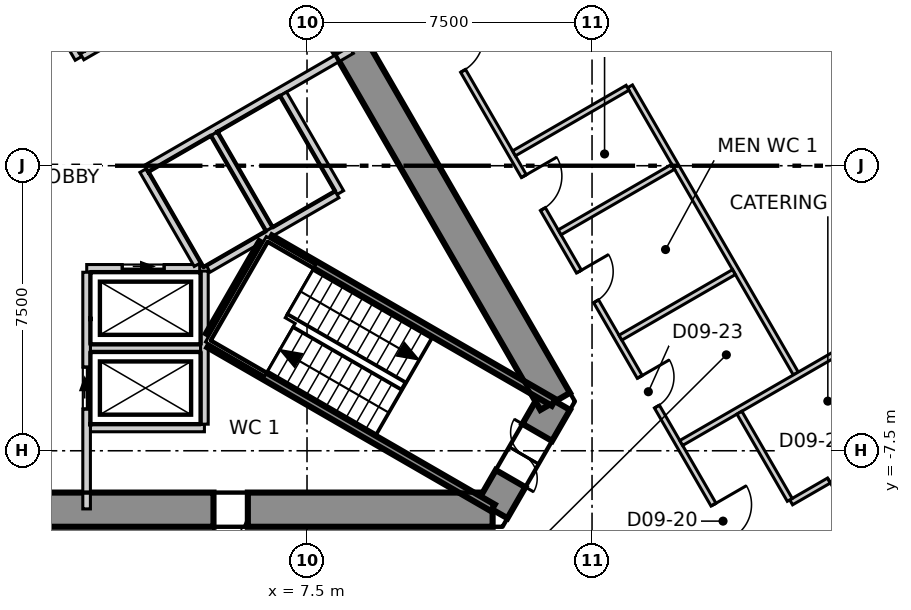
"""IFC4 building model, lengths in metres.
Left out: names, types, materials, properties, quantities, classifications, styles, units other than length and angle.
Written with IfcOpenShell. Run it as: python <this file> out.ifc"""

import sys

from ifc_helpers import new_model, si_unit, direction, frame, frame_2d, origin, place, context, subcontext, project, spatial, polyline, rectangle, outline, extrude, element, fill, save


model = new_model("IFC4")
c1 = context("Model", 3, precision=1e-05, world=origin(), true_north=direction((0.0, 1.0)))
c2 = subcontext(c1, "Body", "Model", "MODEL_VIEW")
j1 = project(units=[si_unit("LENGTHUNIT", "METRE"), si_unit("PLANEANGLEUNIT", "RADIAN")], contexts=[c1])
p1 = place(None, origin())
s1 = spatial("IfcSite", under=j1, at=p1, CompositionType="ELEMENT")
p2 = place(p1, origin())
s2 = spatial("IfcBuilding", under=s1, at=p2, CompositionType="ELEMENT")
p3 = place(p2, frame((0.0, 0.0, 47.3)))
s3 = spatial("IfcBuildingStorey", under=s2, at=p3, CompositionType="ELEMENT", Elevation=47.3)
p4 = place(p3, frame((-12.384, -9.05, -0.3), z_axis=(0.0, 0.0, 1.0), x_axis=(1.0, 0.0, 0.0)))
e1 = element("IfcWall", 1, at=p4, inside=s3, PredefinedType="SHEAR", context=c2, shape_type="SweptSolid", body=[
    extrude(outline(polyline([(-0.26, -0.45), (1.685, -0.45), (3.63, -0.45), (5.576, -0.45), (7.521, -0.45), (9.466, -0.45), (11.411, -0.45), (13.357, -0.45), (15.302, -0.45), (17.247, -0.45), (19.192, -0.45), (21.138, -0.45), (23.083, -0.45), (25.028, -0.45), (24.508, 0.45), (22.643, 0.45), (20.778, 0.45), (18.912, 0.45), (17.047, 0.45), (15.182, 0.45), (13.317, 0.45), (11.451, 0.45), (9.586, 0.45), (7.721, 0.45), (5.856, 0.45), (3.99, 0.45), (2.125, 0.45), (0.26, 0.45), (-0.26, -0.45)])), origin(), (0.0, 0.0, 1.0), 4.0),
])
p5 = place(p4, frame((5.04, 0.0, 0.3)))
e2 = element("IfcOpeningElement", 2, at=p5, cuts=e1, PredefinedType="OPENING", context=c2, shape_type="SweptSolid", body=[
    extrude(rectangle(XDim=0.9, YDim=2.1, at=frame_2d((0.45, 1.05))), frame((0.0, 0.46, 0.0), z_axis=(0.0, -1.0, 0.0), x_axis=(1.0, 0.0, 0.0)), (0.0, 0.0, 1.0), 0.92),
])
p6 = place(p4, frame((17.425, 0.0, 0.3)))
e3 = element("IfcOpeningElement", 3, at=p6, cuts=e1, PredefinedType="OPENING", context=c2, shape_type="SweptSolid", body=[
    extrude(rectangle(XDim=0.9, YDim=2.1, at=frame_2d((0.45, 1.05))), frame((0.0, 0.46, 0.0), z_axis=(0.0, -1.0, 0.0), x_axis=(1.0, 0.0, 0.0)), (0.0, 0.0, 1.0), 0.92),
])
p7 = place(p3, frame((12.384, -9.05, -0.3), z_axis=(0.0, 0.0, 1.0), x_axis=(0.500111984565, 0.865960739811, 0.0)))
e4 = element("IfcWall", 4, at=p7, inside=s3, PredefinedType="SHEAR", context=c2, shape_type="SweptSolid", body=[
    extrude(outline(polyline([(-0.26, -0.45), (1.646, -0.449), (3.551, -0.449), (3.031, 0.45), (1.646, 0.45), (0.26, 0.45), (-0.26, -0.45)])), origin(), (0.0, 0.0, 1.0), 4.0),
])
p8 = place(p7, frame((0.946, 0.0, 0.3)))
e5 = element("IfcOpeningElement", 5, at=p8, cuts=e4, PredefinedType="OPENING", context=c2, shape_type="SweptSolid", body=[
    extrude(rectangle(XDim=1.4, YDim=2.1, at=frame_2d((0.7, 1.05))), frame((0.0, 0.46, 0.0), z_axis=(0.0, -1.0, 0.0), x_axis=(1.0, 0.0, 0.0)), (0.0, 0.0, 1.0), 0.92),
])
p9 = place(p3, frame((14.03, -6.2, -0.3), z_axis=(0.0, 0.0, 1.0), x_axis=(-0.500026485275, 0.866010111964, 0.0)))
e6 = element("IfcWall", 6, at=p9, inside=s3, PredefinedType="SHEAR", context=c2, shape_type="SweptSolid", body=[
    extrude(outline(polyline([(-0.26, -0.449), (1.685, -0.449), (3.63, -0.449), (5.576, -0.449), (7.521, -0.449), (9.466, -0.449), (11.411, -0.449), (13.357, -0.449), (15.302, -0.449), (17.247, -0.45), (19.192, -0.45), (21.138, -0.45), (23.083, -0.45), (25.028, -0.45), (24.509, 0.449), (22.644, 0.449), (20.778, 0.449), (18.913, 0.449), (17.048, 0.449), (15.182, 0.449), (13.317, 0.449), (11.452, 0.449), (9.587, 0.449), (7.721, 0.45), (5.856, 0.45), (3.991, 0.45), (2.125, 0.45), (0.26, 0.45), (-0.26, -0.449)])), origin(), (0.0, 0.0, 1.0), 4.0),
])
p10 = place(p9, frame((11.484, 0.0, 0.3)))
e7 = element("IfcOpeningElement", 7, at=p10, cuts=e6, PredefinedType="OPENING", context=c2, shape_type="SweptSolid", body=[
    extrude(rectangle(XDim=1.8, YDim=2.1, at=frame_2d((0.9, 1.05))), frame((0.0, 0.46, 0.0), z_axis=(0.0, -1.0, 0.0), x_axis=(1.0, 0.0, 0.0)), (0.0, 0.0, 1.0), 0.92),
])
p11 = place(p9, frame((18.976, 0.0, 0.3)))
e8 = element("IfcOpeningElement", 8, at=p11, cuts=e6, PredefinedType="OPENING", context=c2, shape_type="SweptSolid", body=[
    extrude(rectangle(XDim=0.9, YDim=2.1, at=frame_2d((0.45, 1.05))), frame((0.0, 0.46, 0.0), z_axis=(0.0, -1.0, 0.0), x_axis=(1.0, 0.0, 0.0)), (0.0, 0.0, 1.0), 0.92),
])
p12 = place(p3, frame((34.701, -16.089, 0.0), z_axis=(0.0, 0.0, 1.0), x_axis=(-0.499998722828, 0.866026141159, 0.0)))
e9 = element("IfcWall", 9, at=p12, inside=s3, PredefinedType="ELEMENTEDWALL", context=c2, shape_type="SweptSolid", body=[
    extrude(rectangle(XDim=62.548, YDim=0.2, at=frame_2d((31.274, 0.0))), origin(), (0.0, 0.0, 1.0), 3.7),
])
p13 = place(p12, frame((2.25, 0.0, 0.9)))
e10 = element("IfcOpeningElement", 10, at=p13, cuts=e9, PredefinedType="OPENING", context=c2, shape_type="SweptSolid", body=[
    extrude(rectangle(XDim=5.6, YDim=2.5, at=frame_2d((2.8, 1.25))), frame((0.0, 0.11, 0.0), z_axis=(0.0, -1.0, 0.0), x_axis=(1.0, 0.0, 0.0)), (0.0, 0.0, 1.0), 0.22),
])
p14 = place(p12, frame((9.746, 0.0, 0.9)))
e11 = element("IfcOpeningElement", 11, at=p14, cuts=e9, PredefinedType="OPENING", context=c2, shape_type="SweptSolid", body=[
    extrude(rectangle(XDim=5.6, YDim=2.5, at=frame_2d((2.8, 1.25))), frame((0.0, 0.11, 0.0), z_axis=(0.0, -1.0, 0.0), x_axis=(1.0, 0.0, 0.0)), (0.0, 0.0, 1.0), 0.22),
])
p15 = place(p12, frame((17.241, 0.0, 0.9)))
e12 = element("IfcOpeningElement", 12, at=p15, cuts=e9, PredefinedType="OPENING", context=c2, shape_type="SweptSolid", body=[
    extrude(rectangle(XDim=5.6, YDim=2.5, at=frame_2d((2.8, 1.25))), frame((0.0, 0.11, 0.0), z_axis=(0.0, -1.0, 0.0), x_axis=(1.0, 0.0, 0.0)), (0.0, 0.0, 1.0), 0.22),
])
p16 = place(p12, frame((24.736, 0.0, 0.9)))
e13 = element("IfcOpeningElement", 13, at=p16, cuts=e9, PredefinedType="OPENING", context=c2, shape_type="SweptSolid", body=[
    extrude(rectangle(XDim=5.6, YDim=2.5, at=frame_2d((2.8, 1.25))), frame((0.0, 0.11, 0.0), z_axis=(0.0, -1.0, 0.0), x_axis=(1.0, 0.0, 0.0)), (0.0, 0.0, 1.0), 0.22),
])
p17 = place(p12, frame((32.232, 0.0, 0.9)))
e14 = element("IfcOpeningElement", 14, at=p17, cuts=e9, PredefinedType="OPENING", context=c2, shape_type="SweptSolid", body=[
    extrude(rectangle(XDim=5.6, YDim=2.5, at=frame_2d((2.8, 1.25))), frame((0.0, 0.11, 0.0), z_axis=(0.0, -1.0, 0.0), x_axis=(1.0, 0.0, 0.0)), (0.0, 0.0, 1.0), 0.22),
])
p18 = place(p12, frame((39.727, 0.0, 0.9)))
e15 = element("IfcOpeningElement", 15, at=p18, cuts=e9, PredefinedType="OPENING", context=c2, shape_type="SweptSolid", body=[
    extrude(rectangle(XDim=5.6, YDim=2.5, at=frame_2d((2.8, 1.25))), frame((0.0, 0.11, 0.0), z_axis=(0.0, -1.0, 0.0), x_axis=(1.0, 0.0, 0.0)), (0.0, 0.0, 1.0), 0.22),
])
p19 = place(p12, frame((47.222, 0.0, 0.9)))
e16 = element("IfcOpeningElement", 16, at=p19, cuts=e9, PredefinedType="OPENING", context=c2, shape_type="SweptSolid", body=[
    extrude(rectangle(XDim=5.6, YDim=2.5, at=frame_2d((2.8, 1.25))), frame((0.0, 0.11, 0.0), z_axis=(0.0, -1.0, 0.0), x_axis=(1.0, 0.0, 0.0)), (0.0, 0.0, 1.0), 0.22),
])
p20 = place(p12, frame((54.717, 0.0, 0.9)))
e17 = element("IfcOpeningElement", 17, at=p20, cuts=e9, PredefinedType="OPENING", context=c2, shape_type="SweptSolid", body=[
    extrude(rectangle(XDim=5.6, YDim=2.5, at=frame_2d((2.8, 1.25))), frame((0.0, 0.11, 0.0), z_axis=(0.0, -1.0, 0.0), x_axis=(1.0, 0.0, 0.0)), (0.0, 0.0, 1.0), 0.22),
])
p21 = place(p3, frame((0.075, 22.47, 0.0), z_axis=(0.0, 0.0, 1.0), x_axis=(0.500002280369, -0.866024087209, 0.0)))
e18 = element("IfcWall", 18, at=p21, inside=s3, PredefinedType="PARTITIONING", context=c2, shape_type="SweptSolid", body=[
    extrude(rectangle(XDim=38.844, YDim=0.15, at=frame_2d((19.422, 0.0))), origin(), (0.0, 0.0, 1.0), 3.7),
])
p22 = place(p21, frame((36.244, 0.0, 0.0)))
e19 = element("IfcOpeningElement", 19, at=p22, cuts=e18, PredefinedType="OPENING", context=c2, shape_type="SweptSolid", body=[
    extrude(rectangle(XDim=1.0, YDim=2.1, at=frame_2d((0.5, 1.05))), frame((0.0, 0.085, 0.0), z_axis=(0.0, -1.0, 0.0), x_axis=(1.0, 0.0, 0.0)), (0.0, 0.0, 1.0), 0.17),
])
p23 = place(p21, frame((21.963, 0.0, 0.0)))
e20 = element("IfcOpeningElement", 20, at=p23, cuts=e18, PredefinedType="OPENING", context=c2, shape_type="SweptSolid", body=[
    extrude(rectangle(XDim=1.1, YDim=2.1, at=frame_2d((0.55, 1.05))), frame((0.0, 0.085, 0.0), z_axis=(0.0, -1.0, 0.0), x_axis=(1.0, 0.0, 0.0)), (0.0, 0.0, 1.0), 0.17),
])
p24 = place(p21, frame((32.363, 0.0, 0.0)))
e21 = element("IfcOpeningElement", 21, at=p24, cuts=e18, PredefinedType="OPENING", context=c2, shape_type="SweptSolid", body=[
    extrude(rectangle(XDim=0.9, YDim=2.1, at=frame_2d((0.45, 1.05))), frame((0.0, 0.085, 0.0), z_axis=(0.0, -1.0, 0.0), x_axis=(1.0, 0.0, 0.0)), (0.0, 0.0, 1.0), 0.17),
])
p25 = place(p21, frame((29.163, 0.0, 0.0)))
e22 = element("IfcOpeningElement", 22, at=p25, cuts=e18, PredefinedType="OPENING", context=c2, shape_type="SweptSolid", body=[
    extrude(rectangle(XDim=0.9, YDim=2.1, at=frame_2d((0.45, 1.05))), frame((0.0, 0.085, 0.0), z_axis=(0.0, -1.0, 0.0), x_axis=(1.0, 0.0, 0.0)), (0.0, 0.0, 1.0), 0.17),
])
p26 = place(p21, frame((26.263, 0.0, 0.0)))
e23 = element("IfcOpeningElement", 23, at=p26, cuts=e18, PredefinedType="OPENING", context=c2, shape_type="SweptSolid", body=[
    extrude(rectangle(XDim=1.0, YDim=2.1, at=frame_2d((0.5, 1.05))), frame((0.0, 0.085, 0.0), z_axis=(0.0, -1.0, 0.0), x_axis=(1.0, 0.0, 0.0)), (0.0, 0.0, 1.0), 0.17),
])
p27 = place(p21, frame((9.071, 0.0, 0.0)))
e24 = element("IfcOpeningElement", 24, at=p27, cuts=e18, PredefinedType="OPENING", context=c2, shape_type="SweptSolid", body=[
    extrude(rectangle(XDim=1.1, YDim=2.1, at=frame_2d((0.55, 1.05))), frame((0.0, 0.085, 0.0), z_axis=(0.0, -1.0, 0.0), x_axis=(1.0, 0.0, 0.0)), (0.0, 0.0, 1.0), 0.17),
])
p28 = place(p3, frame((15.999, 2.088, 0.0), z_axis=(0.0, 0.0, 1.0), x_axis=(0.500054279689, -0.865994063124, 0.0)))
e25 = element("IfcWall", 25, at=p28, inside=s3, PredefinedType="PARTITIONING", context=c2, shape_type="SweptSolid", body=[
    extrude(rectangle(XDim=8.725, YDim=0.15, at=frame_2d((4.363, 0.0))), origin(), (0.0, 0.0, 1.0), 3.7),
])
p29 = place(p3, frame((12.947, 0.326, 0.0), z_axis=(0.0, 0.0, 1.0), x_axis=(0.865960440485, 0.500112502858, 0.0)))
e26 = element("IfcWall", 26, at=p29, inside=s3, PredefinedType="PARTITIONING", context=c2, shape_type="SweptSolid", body=[
    extrude(rectangle(XDim=3.449, YDim=0.15, at=frame_2d((1.725, 0.0))), origin(), (0.0, 0.0, 1.0), 3.7),
])
p30 = place(p3, frame((14.147, -1.753, 0.0), z_axis=(0.0, 0.0, 1.0), x_axis=(0.865991092016, 0.500059425018, 0.0)))
e27 = element("IfcWall", 27, at=p30, inside=s3, PredefinedType="PARTITIONING", context=c2, shape_type="SweptSolid", body=[
    extrude(rectangle(XDim=3.449, YDim=0.15, at=frame_2d((1.725, 0.0))), origin(), (0.0, 0.0, 1.0), 3.7),
])
p31 = place(p3, frame((15.747, -4.524, 0.0), z_axis=(0.0, 0.0, 1.0), x_axis=(0.865973391227, 0.500090077572, 0.0)))
e28 = element("IfcWall", 28, at=p31, inside=s3, PredefinedType="PARTITIONING", context=c2, shape_type="SweptSolid", body=[
    extrude(rectangle(XDim=3.449, YDim=0.15, at=frame_2d((1.725, 0.0))), origin(), (0.0, 0.0, 1.0), 3.7),
])
p32 = place(p3, frame((17.347, -7.295, 0.0), z_axis=(0.0, 0.0, 1.0), x_axis=(0.866027613664, 0.499996172356, 0.0)))
e29 = element("IfcWall", 29, at=p32, inside=s3, PredefinedType="PARTITIONING", context=c2, shape_type="SweptSolid", body=[
    extrude(rectangle(XDim=10.552, YDim=0.15, at=frame_2d((5.276, 0.0))), origin(), (0.0, 0.0, 1.0), 3.7),
])
p33 = place(p3, frame((20.24, -8.857, 0.0), z_axis=(0.0, 0.0, 1.0), x_axis=(0.866099216793, 0.499872130319, 0.0)))
e30 = element("IfcWall", 30, at=p33, inside=s3, PredefinedType="PARTITIONING", context=c2, shape_type="SweptSolid", body=[
    extrude(rectangle(XDim=3.2, YDim=0.15, at=frame_2d((1.6, 0.0))), origin(), (0.0, 0.0, 1.0), 3.7),
])
p34 = place(p33, frame((1.15, 0.0, 0.0)))
e31 = element("IfcOpeningElement", 31, at=p34, cuts=e30, PredefinedType="OPENING", context=c2, shape_type="SweptSolid", body=[
    extrude(rectangle(XDim=0.9, YDim=2.1, at=frame_2d((0.45, 1.05))), frame((0.0, 0.085, 0.0), z_axis=(0.0, -1.0, 0.0), x_axis=(1.0, 0.0, 0.0)), (0.0, 0.0, 1.0), 0.17),
])
p35 = place(p3, frame((18.878, -6.498, 0.0), z_axis=(0.0, 0.0, 1.0), x_axis=(0.500153222552, -0.865936922628, 0.0)))
e32 = element("IfcWall", 32, at=p35, inside=s3, PredefinedType="PARTITIONING", context=c2, shape_type="SweptSolid", body=[
    extrude(rectangle(XDim=2.649, YDim=0.15, at=frame_2d((1.325, 0.0))), origin(), (0.0, 0.0, 1.0), 3.7),
])
p36 = place(p3, frame((1.8, -4.8, 0.0), z_axis=(0.0, 0.0, 1.0), x_axis=(1.0, 0.0, 0.0)))
e33 = element("IfcWall", 33, at=p36, inside=s3, PredefinedType="SOLIDWALL", context=c2, shape_type="SweptSolid", body=[
    extrude(rectangle(XDim=2.9, YDim=0.2, at=frame_2d((1.45, 0.0))), origin(), (0.0, 0.0, 1.0), 3.7),
])
p37 = place(p3, frame((1.8, -6.9, 0.0), z_axis=(0.0, 0.0, 1.0), x_axis=(1.0, 0.0, 0.0)))
e34 = element("IfcWall", 34, at=p37, inside=s3, PredefinedType="SOLIDWALL", context=c2, shape_type="SweptSolid", body=[
    extrude(rectangle(XDim=3.0, YDim=0.2, at=frame_2d((1.5, 0.0))), origin(), (0.0, 0.0, 1.0), 3.7),
])
p38 = place(p3, frame((1.703, -2.7, 0.0), z_axis=(0.0, 0.0, 1.0), x_axis=(1.0, 0.0, 0.0)))
e35 = element("IfcWall", 35, at=p38, inside=s3, PredefinedType="SOLIDWALL", context=c2, shape_type="SweptSolid", body=[
    extrude(rectangle(XDim=2.973, YDim=0.2, at=frame_2d((1.487, 0.0))), origin(), (0.0, 0.0, 1.0), 3.7),
])
p39 = place(p38, frame((0.936, 0.0, 0.0)))
e36 = element("IfcOpeningElement", 36, at=p39, cuts=e35, PredefinedType="OPENING", context=c2, shape_type="SweptSolid", body=[
    extrude(rectangle(XDim=1.1, YDim=2.1, at=frame_2d((0.55, 1.05))), frame((0.0, 0.11, 0.0), z_axis=(0.0, -1.0, 0.0), x_axis=(1.0, 0.0, 0.0)), (0.0, 0.0, 1.0), 0.22),
])
p40 = place(p3, frame((0.0, 5.4, 0.0), z_axis=(0.0, 0.0, 1.0), x_axis=(0.500103862429, -0.865965430478, 0.0)))
e37 = element("IfcWall", 37, at=p40, inside=s3, PredefinedType="SOLIDWALL", context=c2, shape_type="SweptSolid", body=[
    extrude(rectangle(XDim=2.973, YDim=0.2, at=frame_2d((1.487, 0.0))), origin(), (0.0, 0.0, 1.0), 3.7),
])
p41 = place(p40, frame((0.937, 0.0, 0.0)))
e38 = element("IfcOpeningElement", 38, at=p41, cuts=e37, PredefinedType="OPENING", context=c2, shape_type="SweptSolid", body=[
    extrude(rectangle(XDim=1.1, YDim=2.1, at=frame_2d((0.55, 1.05))), frame((0.0, 0.11, 0.0), z_axis=(0.0, -1.0, 0.0), x_axis=(1.0, 0.0, 0.0)), (0.0, 0.0, 1.0), 0.22),
])
p42 = place(p3, frame((3.19, -0.125, 0.0), z_axis=(0.0, 0.0, 1.0), x_axis=(0.499988658015, -0.866031951983, 0.0)))
e39 = element("IfcWall", 39, at=p42, inside=s3, PredefinedType="SOLIDWALL", context=c2, shape_type="SweptSolid", body=[
    extrude(rectangle(XDim=2.858, YDim=0.2, at=frame_2d((1.429, 0.0))), origin(), (0.0, 0.0, 1.0), 3.7),
])
p43 = place(p3, frame((1.578, 2.874, 0.0), z_axis=(0.0, 0.0, 1.0), x_axis=(0.866031483044, 0.499989470266, 0.0)))
e40 = element("IfcWall", 40, at=p43, inside=s3, PredefinedType="SOLIDWALL", context=c2, shape_type="SweptSolid", body=[
    extrude(rectangle(XDim=6.226, YDim=0.2, at=frame_2d((3.113, 0.0))), origin(), (0.0, 0.0, 1.0), 3.7),
])
p44 = place(p43, frame((2.496, 0.0, 0.0)))
e41 = element("IfcOpeningElement", 41, at=p44, cuts=e40, PredefinedType="OPENING", context=c2, shape_type="SweptSolid", body=[
    extrude(rectangle(XDim=1.1, YDim=2.1, at=frame_2d((0.55, 1.05))), frame((0.0, 0.11, 0.0), z_axis=(0.0, -1.0, 0.0), x_axis=(1.0, 0.0, 0.0)), (0.0, 0.0, 1.0), 0.22),
])
p45 = place(p3, frame((1.7, -9.03, 0.0), z_axis=(0.0, 0.0, 1.0), x_axis=(0.0, 1.0, 0.0)))
e42 = element("IfcWall", 42, at=p45, inside=s3, PredefinedType="SOLIDWALL", context=c2, shape_type="SweptSolid", body=[
    extrude(rectangle(XDim=6.227, YDim=0.2, at=frame_2d((3.114, 0.0))), origin(), (0.0, 0.0, 1.0), 3.7),
])
p46 = place(p45, frame((2.63, 0.0, 0.0)))
e43 = element("IfcOpeningElement", 43, at=p46, cuts=e42, PredefinedType="OPENING", context=c2, shape_type="SweptSolid", body=[
    extrude(rectangle(XDim=1.1, YDim=2.1, at=frame_2d((0.55, 1.05))), frame((0.0, 0.11, 0.0), z_axis=(0.0, -1.0, 0.0), x_axis=(1.0, 0.0, 0.0)), (0.0, 0.0, 1.0), 0.22),
])
p47 = place(p3, frame((4.8, -6.8, 0.0), z_axis=(0.0, 0.0, 1.0), x_axis=(0.0, 1.0, 0.0)))
e44 = element("IfcWall", 44, at=p47, inside=s3, PredefinedType="SOLIDWALL", context=c2, shape_type="SweptSolid", body=[
    extrude(rectangle(XDim=4.029, YDim=0.2, at=frame_2d((2.015, 0.0))), origin(), (0.0, 0.0, 1.0), 3.7),
])
p48 = place(p3, frame((3.278, -0.071, 0.0), z_axis=(0.0, 0.0, 1.0), x_axis=(0.865953757655, 0.500124074208, 0.0)))
e45 = element("IfcWall", 45, at=p48, inside=s3, PredefinedType="SOLIDWALL", context=c2, shape_type="SweptSolid", body=[
    extrude(rectangle(XDim=6.227, YDim=0.2, at=frame_2d((3.113, 0.0))), origin(), (0.0, 0.0, 1.0), 3.7),
])
p49 = place(p3, frame((6.876, 1.891, 0.0), z_axis=(0.0, 0.0, 1.0), x_axis=(0.499990139034, -0.866031096941, 0.0)))
e46 = element("IfcWall", 46, at=p49, inside=s3, PredefinedType="SOLIDWALL", context=c2, shape_type="SweptSolid", body=[
    extrude(rectangle(XDim=3.0, YDim=0.2, at=frame_2d((1.5, 0.0))), origin(), (0.0, 0.0, 1.0), 3.7),
])
p50 = place(p3, frame((5.057, 0.841, 0.0), z_axis=(0.0, 0.0, 1.0), x_axis=(0.50012328804, -0.865954211699, 0.0)))
e47 = element("IfcWall", 47, at=p50, inside=s3, PredefinedType="SOLIDWALL", context=c2, shape_type="SweptSolid", body=[
    extrude(rectangle(XDim=2.9, YDim=0.2, at=frame_2d((1.45, 0.0))), origin(), (0.0, 0.0, 1.0), 3.7),
])
p51 = place(p3, frame((4.9, -2.714, 0.0), z_axis=(0.0, 0.0, 1.0), x_axis=(0.865992350556, 0.500057245502, 0.0)))
e48 = element("IfcWall", 48, at=p51, inside=s3, PredefinedType="SOLIDWALL", context=c2, shape_type="SweptSolid", body=[
    extrude(rectangle(XDim=3.914, YDim=0.2, at=frame_2d((1.957, 0.0))), origin(), (0.0, 0.0, 1.0), 3.7),
])
p52 = place(p3, frame((4.929, -4.693, 0.0), z_axis=(0.0, 0.0, 1.0), x_axis=(0.866010975815, -0.500024989144, 0.0)))
e49 = element("IfcWall", 49, at=p52, inside=s3, PredefinedType="SOLIDWALL", context=c2, shape_type="SweptSolid", body=[
    extrude(rectangle(XDim=8.615, YDim=0.2, at=frame_2d((4.308, 0.0))), origin(), (0.0, 0.0, 1.0), 3.7),
])
p53 = place(p3, frame((4.929, -4.462, 0.0), z_axis=(0.0, 0.0, 1.0), x_axis=(0.500200581029, 0.865909567298, 0.0)))
e50 = element("IfcWall", 50, at=p53, inside=s3, PredefinedType="SOLIDWALL", context=c2, shape_type="SweptSolid", body=[
    extrude(rectangle(XDim=2.799, YDim=0.2, at=frame_2d((1.399, 0.0))), origin(), (0.0, 0.0, 1.0), 3.7),
])
p54 = place(p3, frame((6.529, -1.922, 0.0), z_axis=(0.0, 0.0, 1.0), x_axis=(0.866060059011, -0.499939970583, 0.0)))
e51 = element("IfcWall", 51, at=p54, inside=s3, PredefinedType="SOLIDWALL", context=c2, shape_type="SweptSolid", body=[
    extrude(rectangle(XDim=8.615, YDim=0.2, at=frame_2d((4.307, 0.0))), origin(), (0.0, 0.0, 1.0), 3.7),
])
p55 = place(p39, origin())
e52 = element("IfcDoor", 52, at=p55, inside=s3, OperationType="SLIDING_TO_LEFT", PredefinedType="DOOR", context=c2, shape_type="SweptSolid", body=[
    extrude(rectangle(XDim=1.1, YDim=2.1, at=frame_2d((0.55, 1.05))), frame((0.0, 0.025, 0.0), z_axis=(0.0, -1.0, 0.0), x_axis=(1.0, 0.0, 0.0)), (0.0, 0.0, 1.0), 0.05),
])
fill(e36, e52)
p56 = place(p46, origin())
e53 = element("IfcDoor", 53, at=p56, inside=s3, OperationType="SLIDING_TO_LEFT", PredefinedType="DOOR", context=c2, shape_type="SweptSolid", body=[
    extrude(rectangle(XDim=1.1, YDim=2.1, at=frame_2d((0.55, 1.05))), frame((0.0, 0.025, 0.0), z_axis=(0.0, -1.0, 0.0), x_axis=(1.0, 0.0, 0.0)), (0.0, 0.0, 1.0), 0.05),
])
fill(e43, e53)
p57 = place(p22, origin())
e54 = element("IfcDoor", 54, at=p57, inside=s3, OperationType="SINGLE_SWING_RIGHT", PredefinedType="DOOR", context=c2, shape_type="SweptSolid", body=[
    extrude(rectangle(XDim=1.0, YDim=2.1, at=frame_2d((0.5, 1.05))), frame((0.0, 0.025, 0.0), z_axis=(0.0, -1.0, 0.0), x_axis=(1.0, 0.0, 0.0)), (0.0, 0.0, 1.0), 0.05),
])
fill(e19, e54)
p58 = place(p34, origin())
e55 = element("IfcDoor", 55, at=p58, inside=s3, OperationType="SINGLE_SWING_LEFT", PredefinedType="DOOR", context=c2, shape_type="SweptSolid", body=[
    extrude(rectangle(XDim=0.9, YDim=2.1, at=frame_2d((0.45, 1.05))), frame((0.0, 0.025, 0.0), z_axis=(0.0, -1.0, 0.0), x_axis=(1.0, 0.0, 0.0)), (0.0, 0.0, 1.0), 0.05),
])
fill(e31, e55)
p59 = place(p23, origin())
e56 = element("IfcDoor", 56, at=p59, inside=s3, OperationType="SINGLE_SWING_RIGHT", PredefinedType="DOOR", context=c2, shape_type="SweptSolid", body=[
    extrude(rectangle(XDim=1.1, YDim=2.1, at=frame_2d((0.55, 1.05))), frame((0.0, 0.025, 0.0), z_axis=(0.0, -1.0, 0.0), x_axis=(1.0, 0.0, 0.0)), (0.0, 0.0, 1.0), 0.05),
])
fill(e20, e56)
p60 = place(p24, origin())
e57 = element("IfcDoor", 57, at=p60, inside=s3, OperationType="SINGLE_SWING_RIGHT", PredefinedType="DOOR", context=c2, shape_type="SweptSolid", body=[
    extrude(rectangle(XDim=0.9, YDim=2.1, at=frame_2d((0.45, 1.05))), frame((0.0, 0.025, 0.0), z_axis=(0.0, -1.0, 0.0), x_axis=(1.0, 0.0, 0.0)), (0.0, 0.0, 1.0), 0.05),
])
fill(e21, e57)
p61 = place(p25, origin())
e58 = element("IfcDoor", 58, at=p61, inside=s3, OperationType="SINGLE_SWING_RIGHT", PredefinedType="DOOR", context=c2, shape_type="SweptSolid", body=[
    extrude(rectangle(XDim=0.9, YDim=2.1, at=frame_2d((0.45, 1.05))), frame((0.0, 0.025, 0.0), z_axis=(0.0, -1.0, 0.0), x_axis=(1.0, 0.0, 0.0)), (0.0, 0.0, 1.0), 0.05),
])
fill(e22, e58)
p62 = place(p26, origin())
e59 = element("IfcDoor", 59, at=p62, inside=s3, OperationType="SINGLE_SWING_RIGHT", PredefinedType="DOOR", context=c2, shape_type="SweptSolid", body=[
    extrude(rectangle(XDim=1.0, YDim=2.1, at=frame_2d((0.5, 1.05))), frame((0.0, 0.025, 0.0), z_axis=(0.0, -1.0, 0.0), x_axis=(1.0, 0.0, 0.0)), (0.0, 0.0, 1.0), 0.05),
])
fill(e23, e59)
p63 = place(p8, origin())
e60 = element("IfcDoor", 60, at=p63, inside=s3, OperationType="DOUBLE_DOOR_SINGLE_SWING", PredefinedType="DOOR", context=c2, shape_type="SweptSolid", body=[
    extrude(rectangle(XDim=1.4, YDim=2.1, at=frame_2d((0.7, 1.05))), frame((0.0, 0.025, 0.0), z_axis=(0.0, -1.0, 0.0), x_axis=(1.0, 0.0, 0.0)), (0.0, 0.0, 1.0), 0.05),
])
fill(e5, e60)
p64 = place(p6, origin())
e61 = element("IfcDoor", 61, at=p64, inside=s3, OperationType="SINGLE_SWING_LEFT", PredefinedType="DOOR", context=c2, shape_type="SweptSolid", body=[
    extrude(rectangle(XDim=0.9, YDim=2.1, at=frame_2d((0.45, 1.05))), frame((0.0, 0.175, 0.0), z_axis=(0.0, -1.0, 0.0), x_axis=(1.0, 0.0, 0.0)), (0.0, 0.0, 1.0), 0.05),
])
fill(e3, e61)
save(model, sys.argv[1])
